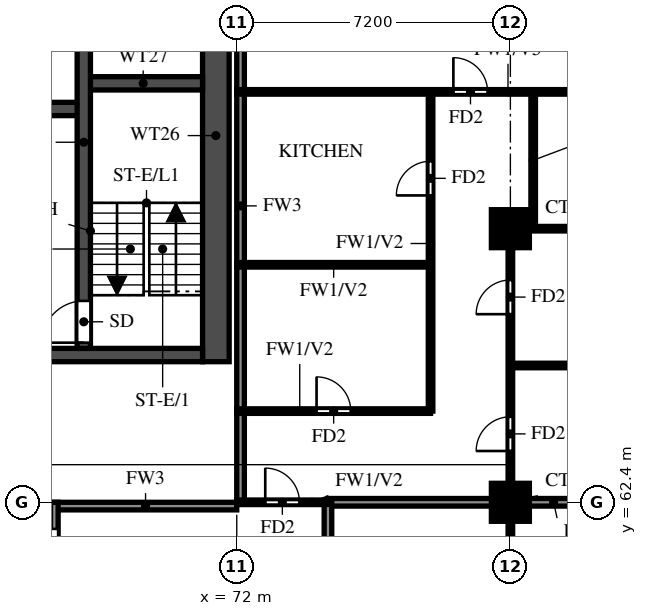
"""IFC4 building model, lengths in metres.
Left out: names, types, materials, properties, quantities, classifications, styles, units other than length and angle.
Written with IfcOpenShell. Run it as: python <this file> out.ifc"""

import sys

from ifc_helpers import new_model, si_unit, direction, frame, frame_2d, origin, origin_2d, place, context, subcontext, project, spatial, rectangle, extrude, source, transform, mapped, element, fill, save


model = new_model("IFC4")
c1 = context("Model", 3, precision=1e-05, world=origin(), true_north=direction((0.0, 1.0)))
c2 = subcontext(c1, "Body", "Model", "MODEL_VIEW")
j1 = project(units=[si_unit("LENGTHUNIT", "METRE"), si_unit("PLANEANGLEUNIT", "RADIAN")], contexts=[c1])
p1 = place(None, origin())
s1 = spatial("IfcSite", under=j1, at=p1, CompositionType="ELEMENT")
p2 = place(p1, origin())
s2 = spatial("IfcBuilding", under=s1, at=p2, CompositionType="ELEMENT")
p3 = place(p2, frame((0.0, 0.0, 167.5)))
s3 = spatial("IfcBuildingStorey", under=s2, at=p3, CompositionType="ELEMENT", Elevation=167.5)
m1 = source(origin(), c2, "Body", "SweptSolid", [
    extrude(rectangle(XDim=1.0, YDim=1.0, at=origin_2d()), origin(), (0.0, 0.0, 1.0), 3.2),
])
for number, where, z_axis, x_axis in (
    (1, (79.2, 62.4, 0.0), (0.0, 0.0, 1.0), (1.0, 0.0, 0.0)),
    (2, (79.2, 69.6, 0.0), (0.0, 0.0, 1.0), (1.0, 0.0, 0.0)),
):
    element("IfcColumn", number, at=place(p3, frame(where, z_axis=z_axis, x_axis=x_axis)), inside=s3, PredefinedType="COLUMN", context=c2, shape_type="MappedRepresentation", body=[
        mapped(m1, transform((0.0, 0.0, 0.0))),
    ])
p4 = place(p3, frame((71.45, 66.1, 0.0), z_axis=(0.0, 0.0, 1.0), x_axis=(0.0, 1.0, 0.0)))
e3 = element("IfcWall", 3, at=p4, inside=s3, PredefinedType="SHEAR", context=c2, shape_type="SweptSolid", body=[
    extrude(rectangle(XDim=11.9, YDim=0.7, at=frame_2d((5.95, 0.0))), origin(), (0.0, 0.0, 1.0), 3.2),
])
p5 = place(p3, frame((29.7, 66.275, 0.0), z_axis=(0.0, 0.0, 1.0), x_axis=(1.0, 0.0, 0.0)))
e4 = element("IfcWall", 4, at=p5, inside=s3, PredefinedType="SHEAR", context=c2, shape_type="SweptSolid", body=[
    extrude(rectangle(XDim=41.4, YDim=0.35, at=frame_2d((20.7, 0.0))), origin(), (0.0, 0.0, 1.0), 3.2),
])
p6 = place(p5, frame((0.925, 0.0, 0.0)))
e5 = element("IfcOpeningElement", 5, at=p6, cuts=e4, PredefinedType="OPENING", context=c2, shape_type="SweptSolid", body=[
    extrude(rectangle(XDim=1.1, YDim=2.1, at=frame_2d((0.55, 1.05))), frame((0.0, 0.185, 0.0), z_axis=(0.0, -1.0, 0.0), x_axis=(1.0, 0.0, 0.0)), (0.0, 0.0, 1.0), 0.37),
])
p7 = place(p5, frame((3.712, 0.0, 0.0)))
e6 = element("IfcOpeningElement", 6, at=p7, cuts=e4, PredefinedType="OPENING", context=c2, shape_type="SweptSolid", body=[
    extrude(rectangle(XDim=1.8, YDim=2.1, at=frame_2d((0.9, 1.05))), frame((0.0, 0.185, 0.0), z_axis=(0.0, -1.0, 0.0), x_axis=(1.0, 0.0, 0.0)), (0.0, 0.0, 1.0), 0.37),
])
p8 = place(p3, frame((32.825, 72.75, 0.0), z_axis=(0.0, 0.0, 1.0), x_axis=(1.0, 0.0, 0.0)))
e7 = element("IfcWall", 7, at=p8, inside=s3, PredefinedType="SHEAR", context=c2, shape_type="SweptSolid", body=[
    extrude(rectangle(XDim=35.15, YDim=0.35, at=frame_2d((17.575, 0.0))), origin(), (0.0, 0.0, 1.0), 3.2),
])
p9 = place(p8, frame((19.8, 0.0, 0.0)))
e8 = element("IfcOpeningElement", 8, at=p9, cuts=e7, PredefinedType="OPENING", context=c2, shape_type="SweptSolid", body=[
    extrude(rectangle(XDim=1.1, YDim=2.1, at=frame_2d((0.55, 1.05))), frame((0.0, 0.185, 0.0), z_axis=(0.0, -1.0, 0.0), x_axis=(1.0, 0.0, 0.0)), (0.0, 0.0, 1.0), 0.37),
])
p10 = place(p8, frame((27.7, 0.0, 0.0)))
e9 = element("IfcOpeningElement", 9, at=p10, cuts=e7, PredefinedType="OPENING", context=c2, shape_type="SweptSolid", body=[
    extrude(rectangle(XDim=1.1, YDim=2.1, at=frame_2d((0.55, 1.05))), frame((0.0, 0.185, 0.0), z_axis=(0.0, -1.0, 0.0), x_axis=(1.0, 0.0, 0.0)), (0.0, 0.0, 1.0), 0.37),
])
p11 = place(p8, frame((30.3, 0.0, 0.0)))
e10 = element("IfcOpeningElement", 10, at=p11, cuts=e7, PredefinedType="OPENING", context=c2, shape_type="SweptSolid", body=[
    extrude(rectangle(XDim=1.1, YDim=2.1, at=frame_2d((0.55, 1.05))), frame((0.0, 0.185, 0.0), z_axis=(0.0, -1.0, 0.0), x_axis=(1.0, 0.0, 0.0)), (0.0, 0.0, 1.0), 0.37),
])
p12 = place(p8, frame((3.8, 0.0, 0.0)))
e11 = element("IfcOpeningElement", 11, at=p12, cuts=e7, PredefinedType="OPENING", context=c2, shape_type="SweptSolid", body=[
    extrude(rectangle(XDim=1.1, YDim=2.1, at=frame_2d((0.55, 1.05))), frame((0.0, 0.185, 0.0), z_axis=(0.0, -1.0, 0.0), x_axis=(1.0, 0.0, 0.0)), (0.0, 0.0, 1.0), 0.37),
])
p13 = place(p8, frame((6.55, 0.0, 0.0)))
e12 = element("IfcOpeningElement", 12, at=p13, cuts=e7, PredefinedType="OPENING", context=c2, shape_type="SweptSolid", body=[
    extrude(rectangle(XDim=1.1, YDim=2.1, at=frame_2d((0.55, 1.05))), frame((0.0, 0.185, 0.0), z_axis=(0.0, -1.0, 0.0), x_axis=(1.0, 0.0, 0.0)), (0.0, 0.0, 1.0), 0.37),
])
p14 = place(p8, frame((9.3, 0.0, 0.0)))
e13 = element("IfcOpeningElement", 13, at=p14, cuts=e7, PredefinedType="OPENING", context=c2, shape_type="SweptSolid", body=[
    extrude(rectangle(XDim=1.1, YDim=2.1, at=frame_2d((0.55, 1.05))), frame((0.0, 0.185, 0.0), z_axis=(0.0, -1.0, 0.0), x_axis=(1.0, 0.0, 0.0)), (0.0, 0.0, 1.0), 0.37),
])
p15 = place(p8, frame((12.05, 0.0, 0.0)))
e14 = element("IfcOpeningElement", 14, at=p15, cuts=e7, PredefinedType="OPENING", context=c2, shape_type="SweptSolid", body=[
    extrude(rectangle(XDim=1.1, YDim=2.1, at=frame_2d((0.55, 1.05))), frame((0.0, 0.185, 0.0), z_axis=(0.0, -1.0, 0.0), x_axis=(1.0, 0.0, 0.0)), (0.0, 0.0, 1.0), 0.37),
])
p16 = place(p8, frame((14.8, 0.0, 0.0)))
e15 = element("IfcOpeningElement", 15, at=p16, cuts=e7, PredefinedType="OPENING", context=c2, shape_type="SweptSolid", body=[
    extrude(rectangle(XDim=1.1, YDim=2.1, at=frame_2d((0.55, 1.05))), frame((0.0, 0.185, 0.0), z_axis=(0.0, -1.0, 0.0), x_axis=(1.0, 0.0, 0.0)), (0.0, 0.0, 1.0), 0.37),
])
p17 = place(p8, frame((17.55, 0.0, 0.0)))
e16 = element("IfcOpeningElement", 16, at=p17, cuts=e7, PredefinedType="OPENING", context=c2, shape_type="SweptSolid", body=[
    extrude(rectangle(XDim=1.1, YDim=2.1, at=frame_2d((0.55, 1.05))), frame((0.0, 0.185, 0.0), z_axis=(0.0, -1.0, 0.0), x_axis=(1.0, 0.0, 0.0)), (0.0, 0.0, 1.0), 0.37),
])
p18 = place(p8, frame((0.938, 0.0, 0.0)))
e17 = element("IfcOpeningElement", 17, at=p18, cuts=e7, PredefinedType="OPENING", context=c2, shape_type="SweptSolid", body=[
    extrude(rectangle(XDim=1.1, YDim=2.1, at=frame_2d((0.55, 1.05))), frame((0.0, 0.185, 0.0), z_axis=(0.0, -1.0, 0.0), x_axis=(1.0, 0.0, 0.0)), (0.0, 0.0, 1.0), 0.37),
])
p19 = place(p3, frame((67.975, 73.425, 0.0), z_axis=(0.0, 0.0, 1.0), x_axis=(1.0, 0.0, 0.0)))
e18 = element("IfcWall", 18, at=p19, inside=s3, PredefinedType="SHEAR", context=c2, shape_type="SweptSolid", body=[
    extrude(rectangle(XDim=3.125, YDim=0.35, at=frame_2d((1.562, 0.0))), origin(), (0.0, 0.0, 1.0), 3.2),
])
p20 = place(p3, frame((67.975, 66.45, 0.0), z_axis=(0.0, 0.0, 1.0), x_axis=(0.0, 1.0, 0.0)))
e19 = element("IfcWall", 19, at=p20, inside=s3, PredefinedType="SHEAR", context=c2, shape_type="SweptSolid", body=[
    extrude(rectangle(XDim=10.85, YDim=0.35, at=frame_2d((5.425, 0.0))), origin(), (0.0, 0.0, 1.0), 3.2),
])
p21 = place(p20, frame((0.15, 0.0, 0.0)))
e20 = element("IfcOpeningElement", 20, at=p21, cuts=e19, PredefinedType="OPENING", context=c2, shape_type="SweptSolid", body=[
    extrude(rectangle(XDim=1.1, YDim=2.1, at=frame_2d((0.55, 1.05))), frame((0.0, 0.185, 0.0), z_axis=(0.0, -1.0, 0.0), x_axis=(1.0, 0.0, 0.0)), (0.0, 0.0, 1.0), 0.37),
])
p22 = place(p3, frame((67.2, 62.3, 0.0), z_axis=(0.0, 0.0, 1.0), x_axis=(1.0, 0.0, 0.0)))
e21 = element("IfcWall", 21, at=p22, inside=s3, PredefinedType="SOLIDWALL", context=c2, shape_type="SweptSolid", body=[
    extrude(rectangle(XDim=4.8, YDim=0.2, at=frame_2d((2.4, 0.0))), origin(), (0.0, 0.0, 1.0), 3.2),
])
p23 = place(p3, frame((67.2, 45.6, 0.0), z_axis=(0.0, 0.0, 1.0), x_axis=(0.0, 1.0, 0.0)))
e22 = element("IfcWall", 22, at=p23, inside=s3, PredefinedType="SOLIDWALL", context=c2, shape_type="SweptSolid", body=[
    extrude(rectangle(XDim=16.8, YDim=0.2, at=frame_2d((8.4, 0.0))), origin(), (0.0, 0.0, 1.0), 3.2),
])
p24 = place(p23, frame((6.7, 0.0, 0.0)))
e23 = element("IfcOpeningElement", 23, at=p24, cuts=e22, PredefinedType="OPENING", context=c2, shape_type="SweptSolid", body=[
    extrude(rectangle(XDim=1.0, YDim=2.1, at=frame_2d((0.5, 1.05))), frame((0.0, 0.11, 0.0), z_axis=(0.0, -1.0, 0.0), x_axis=(1.0, 0.0, 0.0)), (0.0, 0.0, 1.0), 0.22),
])
p25 = place(p23, frame((15.1, 0.0, 0.0)))
e24 = element("IfcOpeningElement", 24, at=p25, cuts=e22, PredefinedType="OPENING", context=c2, shape_type="SweptSolid", body=[
    extrude(rectangle(XDim=1.0, YDim=2.1, at=frame_2d((0.5, 1.05))), frame((0.0, 0.11, 0.0), z_axis=(0.0, -1.0, 0.0), x_axis=(1.0, 0.0, 0.0)), (0.0, 0.0, 1.0), 0.22),
])
p26 = place(p23, frame((0.7, 0.0, 0.0)))
e25 = element("IfcOpeningElement", 25, at=p26, cuts=e22, PredefinedType="OPENING", context=c2, shape_type="SweptSolid", body=[
    extrude(rectangle(XDim=1.0, YDim=2.1, at=frame_2d((0.5, 1.05))), frame((0.0, 0.11, 0.0), z_axis=(0.0, -1.0, 0.0), x_axis=(1.0, 0.0, 0.0)), (0.0, 0.0, 1.0), 0.22),
])
p27 = place(p3, frame((72.1, 62.4, 0.0), z_axis=(0.0, 0.0, 1.0), x_axis=(0.0, 1.0, 0.0)))
e26 = element("IfcWall", 26, at=p27, inside=s3, PredefinedType="SOLIDWALL", context=c2, shape_type="SweptSolid", body=[
    extrude(rectangle(XDim=15.6, YDim=0.2, at=frame_2d((7.8, 0.0))), origin(), (0.0, 0.0, 1.0), 3.2),
])
p28 = place(p3, frame((74.4, 62.4, 0.0), z_axis=(0.0, 0.0, 1.0), x_axis=(1.0, 0.0, 0.0)))
e27 = element("IfcWall", 27, at=p28, inside=s3, PredefinedType="SOLIDWALL", context=c2, shape_type="SweptSolid", body=[
    extrude(rectangle(XDim=11.875, YDim=0.2, at=frame_2d((5.938, 0.0))), origin(), (0.0, 0.0, 1.0), 3.2),
])
p29 = place(p3, frame((74.4, 60.0, 0.0), z_axis=(0.0, 0.0, 1.0), x_axis=(0.0, 1.0, 0.0)))
e28 = element("IfcWall", 28, at=p29, inside=s3, PredefinedType="SOLIDWALL", context=c2, shape_type="SweptSolid", body=[
    extrude(rectangle(XDim=2.4, YDim=0.2, at=frame_2d((1.2, 0.0))), origin(), (0.0, 0.0, 1.0), 3.2),
])
p30 = place(p3, frame((72.0, 62.4, 0.0), z_axis=(0.0, 0.0, 1.0), x_axis=(1.0, 0.0, 0.0)))
e29 = element("IfcWall", 29, at=p30, inside=s3, PredefinedType="PARTITIONING", context=c2, shape_type="SweptSolid", body=[
    extrude(rectangle(XDim=2.4, YDim=0.12, at=frame_2d((1.2, 0.0))), origin(), (0.0, 0.0, 1.0), 3.2),
])
p31 = place(p30, frame((0.75, 0.0, 0.0)))
e30 = element("IfcOpeningElement", 30, at=p31, cuts=e29, PredefinedType="OPENING", context=c2, shape_type="SweptSolid", body=[
    extrude(rectangle(XDim=0.9, YDim=2.1, at=frame_2d((0.45, 1.05))), frame((0.0, 0.07, 0.0), z_axis=(0.0, -1.0, 0.0), x_axis=(1.0, 0.0, 0.0)), (0.0, 0.0, 1.0), 0.14),
])
p32 = place(p3, frame((72.0, 64.8, 0.0), z_axis=(0.0, 0.0, 1.0), x_axis=(1.0, 0.0, 0.0)))
e31 = element("IfcWall", 31, at=p32, inside=s3, PredefinedType="PARTITIONING", context=c2, shape_type="SweptSolid", body=[
    extrude(rectangle(XDim=5.1, YDim=0.12, at=frame_2d((2.55, 0.0))), origin(), (0.0, 0.0, 1.0), 3.2),
])
p33 = place(p32, frame((2.1, 0.0, 0.0)))
e32 = element("IfcOpeningElement", 32, at=p33, cuts=e31, PredefinedType="OPENING", context=c2, shape_type="SweptSolid", body=[
    extrude(rectangle(XDim=0.9, YDim=2.1, at=frame_2d((0.45, 1.05))), frame((0.0, 0.07, 0.0), z_axis=(0.0, -1.0, 0.0), x_axis=(1.0, 0.0, 0.0)), (0.0, 0.0, 1.0), 0.14),
])
p34 = place(p3, frame((79.2, 66.0, 0.0), z_axis=(0.0, 0.0, 1.0), x_axis=(1.0, 0.0, 0.0)))
e33 = element("IfcWall", 33, at=p34, inside=s3, PredefinedType="PARTITIONING", context=c2, shape_type="SweptSolid", body=[
    extrude(rectangle(XDim=7.075, YDim=0.12, at=frame_2d((3.538, 0.0))), origin(), (0.0, 0.0, 1.0), 2.3),
])
p35 = place(p3, frame((72.0, 68.65, 0.0), z_axis=(0.0, 0.0, 1.0), x_axis=(1.0, 0.0, 0.0)))
e34 = element("IfcWall", 34, at=p35, inside=s3, PredefinedType="PARTITIONING", context=c2, shape_type="SweptSolid", body=[
    extrude(rectangle(XDim=5.1, YDim=0.12, at=frame_2d((2.55, 0.0))), origin(), (0.0, 0.0, 1.0), 3.2),
])
p36 = place(p3, frame((79.2, 69.6, 0.0), z_axis=(0.0, 0.0, 1.0), x_axis=(1.0, 0.0, 0.0)))
e35 = element("IfcWall", 35, at=p36, inside=s3, PredefinedType="PARTITIONING", context=c2, shape_type="SweptSolid", body=[
    extrude(rectangle(XDim=7.075, YDim=0.12, at=frame_2d((3.538, 0.0))), origin(), (0.0, 0.0, 1.0), 3.2),
])
p37 = place(p36, frame((3.438, 0.0, 0.0)))
e36 = element("IfcOpeningElement", 36, at=p37, cuts=e35, PredefinedType="OPENING", context=c2, shape_type="SweptSolid", body=[
    extrude(rectangle(XDim=0.8, YDim=2.1, at=frame_2d((0.4, 1.05))), frame((0.0, 0.07, 0.0), z_axis=(0.0, -1.0, 0.0), x_axis=(1.0, 0.0, 0.0)), (0.0, 0.0, 1.0), 0.14),
])
p38 = place(p3, frame((72.0, 73.2, 0.0), z_axis=(0.0, 0.0, 1.0), x_axis=(1.0, 0.0, 0.0)))
e37 = element("IfcWall", 37, at=p38, inside=s3, PredefinedType="PARTITIONING", context=c2, shape_type="SweptSolid", body=[
    extrude(rectangle(XDim=14.275, YDim=0.12, at=frame_2d((7.137, 0.0))), origin(), (0.0, 0.0, 1.0), 2.3),
])
p39 = place(p38, frame((5.7, 0.0, 0.0)))
e38 = element("IfcOpeningElement", 38, at=p39, cuts=e37, PredefinedType="OPENING", context=c2, shape_type="SweptSolid", body=[
    extrude(rectangle(XDim=0.9, YDim=2.1, at=frame_2d((0.45, 1.05))), frame((0.0, 0.07, 0.0), z_axis=(0.0, -1.0, 0.0), x_axis=(1.0, 0.0, 0.0)), (0.0, 0.0, 1.0), 0.14),
])
p40 = place(p3, frame((77.1, 64.8, 0.0), z_axis=(0.0, 0.0, 1.0), x_axis=(0.0, 1.0, 0.0)))
e39 = element("IfcWall", 39, at=p40, inside=s3, PredefinedType="PARTITIONING", context=c2, shape_type="SweptSolid", body=[
    extrude(rectangle(XDim=8.4, YDim=0.12, at=frame_2d((4.2, 0.0))), origin(), (0.0, 0.0, 1.0), 3.2),
])
p41 = place(p40, frame((5.675, 0.0, 0.0)))
e40 = element("IfcOpeningElement", 40, at=p41, cuts=e39, PredefinedType="OPENING", context=c2, shape_type="SweptSolid", body=[
    extrude(rectangle(XDim=0.9, YDim=2.1, at=frame_2d((0.45, 1.05))), frame((0.0, 0.07, 0.0), z_axis=(0.0, -1.0, 0.0), x_axis=(1.0, 0.0, 0.0)), (0.0, 0.0, 1.0), 0.14),
])
p42 = place(p3, frame((79.2, 58.8, 0.0), z_axis=(0.0, 0.0, 1.0), x_axis=(0.0, 1.0, 0.0)))
e41 = element("IfcWall", 41, at=p42, inside=s3, PredefinedType="PARTITIONING", context=c2, shape_type="SweptSolid", body=[
    extrude(rectangle(XDim=10.8, YDim=0.12, at=frame_2d((5.4, 0.0))), origin(), (0.0, 0.0, 1.0), 3.2),
])
p43 = place(p42, frame((1.35, 0.0, 0.0)))
e42 = element("IfcOpeningElement", 42, at=p43, cuts=e41, PredefinedType="OPENING", context=c2, shape_type="SweptSolid", body=[
    extrude(rectangle(XDim=0.9, YDim=2.1, at=frame_2d((0.45, 1.05))), frame((0.0, 0.07, 0.0), z_axis=(0.0, -1.0, 0.0), x_axis=(1.0, 0.0, 0.0)), (0.0, 0.0, 1.0), 0.14),
])
p44 = place(p42, frame((4.95, 0.0, 0.0)))
e43 = element("IfcOpeningElement", 43, at=p44, cuts=e41, PredefinedType="OPENING", context=c2, shape_type="SweptSolid", body=[
    extrude(rectangle(XDim=0.9, YDim=2.1, at=frame_2d((0.45, 1.05))), frame((0.0, 0.07, 0.0), z_axis=(0.0, -1.0, 0.0), x_axis=(1.0, 0.0, 0.0)), (0.0, 0.0, 1.0), 0.14),
])
p45 = place(p42, frame((8.55, 0.0, 0.0)))
e44 = element("IfcOpeningElement", 44, at=p45, cuts=e41, PredefinedType="OPENING", context=c2, shape_type="SweptSolid", body=[
    extrude(rectangle(XDim=0.9, YDim=2.1, at=frame_2d((0.45, 1.05))), frame((0.0, 0.07, 0.0), z_axis=(0.0, -1.0, 0.0), x_axis=(1.0, 0.0, 0.0)), (0.0, 0.0, 1.0), 0.14),
])
p46 = place(p3, frame((79.8, 69.6, 0.0), z_axis=(0.0, 0.0, 1.0), x_axis=(0.0, 1.0, 0.0)))
e45 = element("IfcWall", 45, at=p46, inside=s3, PredefinedType="PARTITIONING", context=c2, shape_type="SweptSolid", body=[
    extrude(rectangle(XDim=3.6, YDim=0.12, at=frame_2d((1.8, 0.0))), origin(), (0.0, 0.0, 1.0), 3.2),
])
p47 = place(p21, origin())
e46 = element("IfcDoor", 46, at=p47, inside=s3, OperationType="SINGLE_SWING_LEFT", PredefinedType="DOOR", context=c2, shape_type="SweptSolid", body=[
    extrude(rectangle(XDim=1.1, YDim=2.1, at=frame_2d((0.55, 1.05))), frame((0.0, 0.025, 0.0), z_axis=(0.0, -1.0, 0.0), x_axis=(1.0, 0.0, 0.0)), (0.0, 0.0, 1.0), 0.05),
])
fill(e20, e46)
p48 = place(p31, origin())
e47 = element("IfcDoor", 47, at=p48, inside=s3, OperationType="SINGLE_SWING_LEFT", PredefinedType="DOOR", context=c2, shape_type="SweptSolid", body=[
    extrude(rectangle(XDim=0.9, YDim=2.1, at=frame_2d((0.45, 1.05))), frame((0.0, 0.025, 0.0), z_axis=(0.0, -1.0, 0.0), x_axis=(1.0, 0.0, 0.0)), (0.0, 0.0, 1.0), 0.05),
])
fill(e30, e47)
p49 = place(p25, origin())
e48 = element("IfcDoor", 48, at=p49, inside=s3, OperationType="SINGLE_SWING_LEFT", PredefinedType="DOOR", context=c2, shape_type="SweptSolid", body=[
    extrude(rectangle(XDim=1.0, YDim=2.1, at=frame_2d((0.5, 1.05))), frame((0.0, 0.025, 0.0), z_axis=(0.0, -1.0, 0.0), x_axis=(1.0, 0.0, 0.0)), (0.0, 0.0, 1.0), 0.05),
])
fill(e24, e48)
p50 = place(p44, origin())
e49 = element("IfcDoor", 49, at=p50, inside=s3, OperationType="SINGLE_SWING_RIGHT", PredefinedType="DOOR", context=c2, shape_type="SweptSolid", body=[
    extrude(rectangle(XDim=0.9, YDim=2.1, at=frame_2d((0.45, 1.05))), frame((0.0, 0.025, 0.0), z_axis=(0.0, -1.0, 0.0), x_axis=(1.0, 0.0, 0.0)), (0.0, 0.0, 1.0), 0.05),
])
fill(e43, e49)
p51 = place(p45, origin())
e50 = element("IfcDoor", 50, at=p51, inside=s3, OperationType="SINGLE_SWING_LEFT", PredefinedType="DOOR", context=c2, shape_type="SweptSolid", body=[
    extrude(rectangle(XDim=0.9, YDim=2.1, at=frame_2d((0.45, 1.05))), frame((0.0, 0.025, 0.0), z_axis=(0.0, -1.0, 0.0), x_axis=(1.0, 0.0, 0.0)), (0.0, 0.0, 1.0), 0.05),
])
fill(e44, e50)
p52 = place(p39, origin())
e51 = element("IfcDoor", 51, at=p52, inside=s3, OperationType="SINGLE_SWING_RIGHT", PredefinedType="DOOR", context=c2, shape_type="SweptSolid", body=[
    extrude(rectangle(XDim=0.9, YDim=2.1, at=frame_2d((0.45, 1.05))), frame((0.0, 0.025, 0.0), z_axis=(0.0, -1.0, 0.0), x_axis=(1.0, 0.0, 0.0)), (0.0, 0.0, 1.0), 0.05),
])
fill(e38, e51)
p53 = place(p33, origin())
e52 = element("IfcDoor", 52, at=p53, inside=s3, OperationType="SINGLE_SWING_LEFT", PredefinedType="DOOR", context=c2, shape_type="SweptSolid", body=[
    extrude(rectangle(XDim=0.9, YDim=2.1, at=frame_2d((0.45, 1.05))), frame((0.0, 0.025, 0.0), z_axis=(0.0, -1.0, 0.0), x_axis=(1.0, 0.0, 0.0)), (0.0, 0.0, 1.0), 0.05),
])
fill(e32, e52)
p54 = place(p41, origin())
e53 = element("IfcDoor", 53, at=p54, inside=s3, OperationType="SINGLE_SWING_LEFT", PredefinedType="DOOR", context=c2, shape_type="SweptSolid", body=[
    extrude(rectangle(XDim=0.9, YDim=2.1, at=frame_2d((0.45, 1.05))), frame((0.0, 0.025, 0.0), z_axis=(0.0, -1.0, 0.0), x_axis=(1.0, 0.0, 0.0)), (0.0, 0.0, 1.0), 0.05),
])
fill(e40, e53)
save(model, sys.argv[1])
